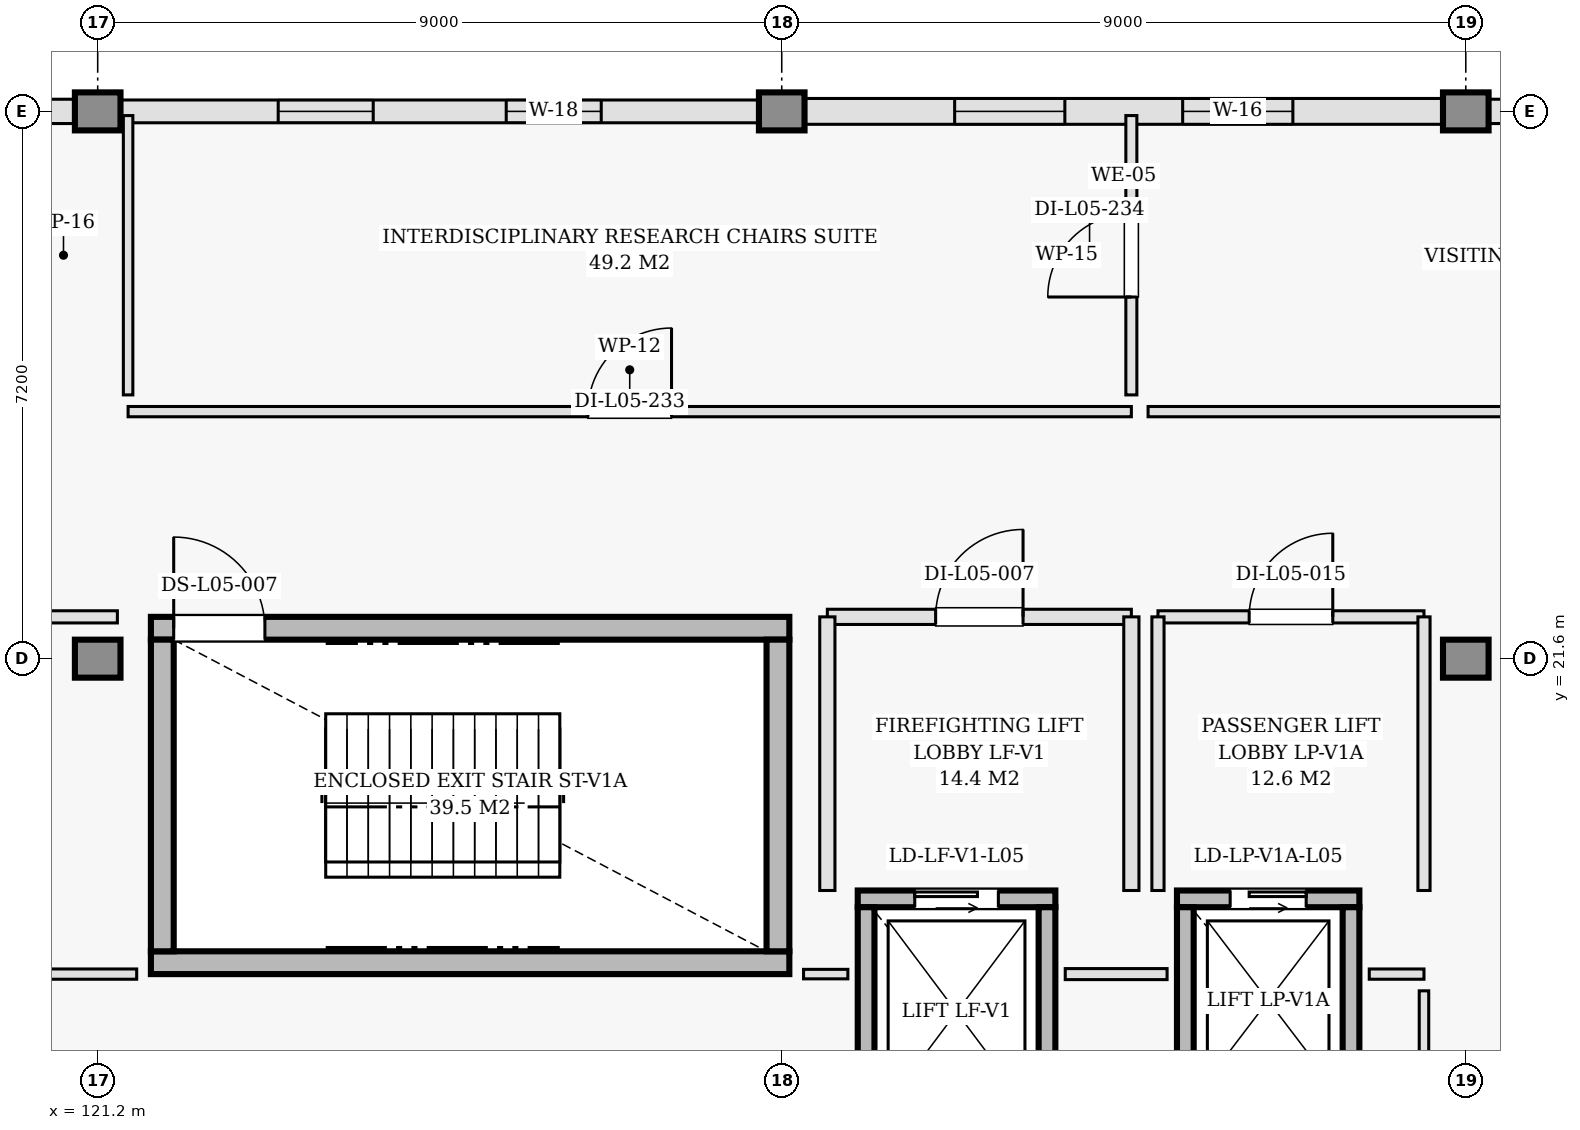
"""IFC4 building model, lengths in metres.
Left out: names, types, materials, properties, quantities, classifications, styles, units other than length and angle.
Written with IfcOpenShell. Run it as: python <this file> out.ifc"""

import sys

from ifc_helpers import new_model, si_unit, direction, frame, frame_2d, origin, origin_2d, place, context, subcontext, project, spatial, rectangle, extrude, element, fill, save


model = new_model("IFC4")
c1 = context("Model", 3, precision=1e-05, world=origin(), true_north=direction((0.0, 1.0)))
c2 = subcontext(c1, "Body", "Model", "MODEL_VIEW")
j1 = project(units=[si_unit("LENGTHUNIT", "METRE"), si_unit("PLANEANGLEUNIT", "RADIAN")], contexts=[c1])
p1 = place(None, origin())
s1 = spatial("IfcSite", under=j1, at=p1, CompositionType="ELEMENT")
p2 = place(p1, origin())
s2 = spatial("IfcBuilding", under=s1, at=p2, CompositionType="ELEMENT")
p3 = place(p2, frame((0.0, 0.0, 22.2)))
s3 = spatial("IfcBuildingStorey", under=s2, at=p3, CompositionType="ELEMENT", Elevation=22.2)
for number, where, z_axis, x_axis in (
    (1, (121.2, 21.6, 0.0), (0.0, 0.0, 1.0), (1.0, 0.0, 0.0)),
    (2, (121.2, 28.8, 0.0), (0.0, 0.0, 1.0), (1.0, 0.0, 0.0)),
    (3, (130.2, 28.8, 0.0), (0.0, 0.0, 1.0), (1.0, 0.0, 0.0)),
    (4, (139.2, 21.6, 0.0), (0.0, 0.0, 1.0), (1.0, 0.0, 0.0)),
    (5, (139.2, 28.8, 0.0), (0.0, 0.0, 1.0), (1.0, 0.0, 0.0)),
):
    element("IfcColumn", number, at=place(p3, frame(where, z_axis=z_axis, x_axis=x_axis)), inside=s3, PredefinedType="COLUMN", context=c2, shape_type="SweptSolid", body=[
        extrude(rectangle(XDim=0.5, YDim=0.5, at=origin_2d()), origin(), (0.0, 0.0, 1.0), 4.2),
    ])
p4 = place(p3, frame((148.2, 28.8, 0.0), z_axis=(0.0, 0.0, 1.0), x_axis=(-1.0, 0.0, 0.0)))
e6 = element("IfcWall", 6, at=p4, inside=s3, PredefinedType="SOLIDWALL", context=c2, shape_type="SweptSolid", body=[
    extrude(rectangle(XDim=9.0, YDim=0.32, at=frame_2d((4.5, 0.0))), origin(), (0.0, 0.0, 1.0), 3.165),
])
p5 = place(p4, frame((2.575, 0.0, 0.9)))
e7 = element("IfcOpeningElement", 7, at=p5, cuts=e6, PredefinedType="OPENING", context=c2, shape_type="SweptSolid", body=[
    extrude(rectangle(XDim=0.85, YDim=1.3, at=frame_2d((0.425, 0.65))), frame((0.0, 0.17, 0.0), z_axis=(0.0, -1.0, 0.0), x_axis=(1.0, 0.0, 0.0)), (0.0, 0.0, 1.0), 0.34),
])
p6 = place(p4, frame((5.575, 0.0, 0.9)))
e8 = element("IfcOpeningElement", 8, at=p6, cuts=e6, PredefinedType="OPENING", context=c2, shape_type="SweptSolid", body=[
    extrude(rectangle(XDim=0.85, YDim=1.3, at=frame_2d((0.425, 0.65))), frame((0.0, 0.17, 0.0), z_axis=(0.0, -1.0, 0.0), x_axis=(1.0, 0.0, 0.0)), (0.0, 0.0, 1.0), 0.34),
])
p7 = place(p3, frame((139.2, 28.8, 0.0), z_axis=(0.0, 0.0, 1.0), x_axis=(-1.0, 0.0, 0.0)))
e9 = element("IfcWall", 9, at=p7, inside=s3, PredefinedType="SOLIDWALL", context=c2, shape_type="SweptSolid", body=[
    extrude(rectangle(XDim=9.0, YDim=0.34, at=frame_2d((4.5, 0.0))), origin(), (0.0, 0.0, 1.0), 3.165),
])
p8 = place(p7, frame((2.275, 0.0, 0.9)))
e10 = element("IfcOpeningElement", 10, at=p8, cuts=e9, PredefinedType="OPENING", context=c2, shape_type="SweptSolid", body=[
    extrude(rectangle(XDim=1.45, YDim=1.6, at=frame_2d((0.725, 0.8))), frame((0.0, 0.18, 0.0), z_axis=(0.0, -1.0, 0.0), x_axis=(1.0, 0.0, 0.0)), (0.0, 0.0, 1.0), 0.36),
])
p9 = place(p7, frame((5.275, 0.0, 0.9)))
e11 = element("IfcOpeningElement", 11, at=p9, cuts=e9, PredefinedType="OPENING", context=c2, shape_type="SweptSolid", body=[
    extrude(rectangle(XDim=1.45, YDim=1.6, at=frame_2d((0.725, 0.8))), frame((0.0, 0.18, 0.0), z_axis=(0.0, -1.0, 0.0), x_axis=(1.0, 0.0, 0.0)), (0.0, 0.0, 1.0), 0.36),
])
p10 = place(p3, frame((130.2, 28.8, 0.0), z_axis=(0.0, 0.0, 1.0), x_axis=(-1.0, 0.0, 0.0)))
e12 = element("IfcWall", 12, at=p10, inside=s3, PredefinedType="SOLIDWALL", context=c2, shape_type="SweptSolid", body=[
    extrude(rectangle(XDim=9.0, YDim=0.3, at=frame_2d((4.5, 0.0))), origin(), (0.0, 0.0, 1.0), 3.165),
])
p11 = place(p10, frame((2.375, 0.0, 0.9)))
e13 = element("IfcOpeningElement", 13, at=p11, cuts=e12, PredefinedType="OPENING", context=c2, shape_type="SweptSolid", body=[
    extrude(rectangle(XDim=1.25, YDim=1.5, at=frame_2d((0.625, 0.75))), frame((0.0, 0.16, 0.0), z_axis=(0.0, -1.0, 0.0), x_axis=(1.0, 0.0, 0.0)), (0.0, 0.0, 1.0), 0.32),
])
p12 = place(p10, frame((5.375, 0.0, 0.9)))
e14 = element("IfcOpeningElement", 14, at=p12, cuts=e12, PredefinedType="OPENING", context=c2, shape_type="SweptSolid", body=[
    extrude(rectangle(XDim=1.25, YDim=1.5, at=frame_2d((0.625, 0.75))), frame((0.0, 0.16, 0.0), z_axis=(0.0, -1.0, 0.0), x_axis=(1.0, 0.0, 0.0)), (0.0, 0.0, 1.0), 0.32),
])
p13 = place(p3, frame((121.2, 28.8, 0.0), z_axis=(0.0, 0.0, 1.0), x_axis=(-1.0, 0.0, 0.0)))
e15 = element("IfcWall", 15, at=p13, inside=s3, PredefinedType="SOLIDWALL", context=c2, shape_type="SweptSolid", body=[
    extrude(rectangle(XDim=8.75, YDim=0.32, at=frame_2d((4.375, 0.0))), origin(), (0.0, 0.0, 1.0), 3.165),
])
p14 = place(p13, frame((2.392, 0.0, 0.9)))
e16 = element("IfcOpeningElement", 16, at=p14, cuts=e15, PredefinedType="OPENING", context=c2, shape_type="SweptSolid", body=[
    extrude(rectangle(XDim=1.05, YDim=1.4, at=frame_2d((0.525, 0.7))), frame((0.0, 0.17, 0.0), z_axis=(0.0, -1.0, 0.0), x_axis=(1.0, 0.0, 0.0)), (0.0, 0.0, 1.0), 0.34),
])
p15 = place(p13, frame((5.308, 0.0, 0.9)))
e17 = element("IfcOpeningElement", 17, at=p15, cuts=e15, PredefinedType="OPENING", context=c2, shape_type="SweptSolid", body=[
    extrude(rectangle(XDim=1.05, YDim=1.4, at=frame_2d((0.525, 0.7))), frame((0.0, 0.17, 0.0), z_axis=(0.0, -1.0, 0.0), x_axis=(1.0, 0.0, 0.0)), (0.0, 0.0, 1.0), 0.34),
])
p16 = place(p3, frame((121.9, 17.6, 0.0), z_axis=(0.0, 0.0, 1.0), x_axis=(1.0, 0.0, 0.0)))
e18 = element("IfcWall", 18, at=p16, inside=s3, PredefinedType="SHEAR", context=c2, shape_type="SweptSolid", body=[
    extrude(rectangle(XDim=8.4, YDim=0.3, at=frame_2d((4.2, 0.0))), origin(), (0.0, 0.0, 1.0), 3.98),
])
p17 = place(p3, frame((121.9, 22.0, 0.0), z_axis=(0.0, 0.0, 1.0), x_axis=(1.0, 0.0, 0.0)))
e19 = element("IfcWall", 19, at=p17, inside=s3, PredefinedType="SHEAR", context=c2, shape_type="SweptSolid", body=[
    extrude(rectangle(XDim=8.4, YDim=0.3, at=frame_2d((4.2, 0.0))), origin(), (0.0, 0.0, 1.0), 3.98),
])
p18 = place(p17, frame((0.3, 0.0, 0.0)))
e20 = element("IfcOpeningElement", 20, at=p18, cuts=e19, PredefinedType="OPENING", context=c2, shape_type="SweptSolid", body=[
    extrude(rectangle(XDim=1.2, YDim=2.15, at=frame_2d((0.6, 1.075))), frame((0.0, 0.16, 0.0), z_axis=(0.0, -1.0, 0.0), x_axis=(1.0, 0.0, 0.0)), (0.0, 0.0, 1.0), 0.32),
])
for number, where, z_axis, x_axis in (
    (21, (122.05, 17.75, 0.0), (0.0, 0.0, 1.0), (0.0, 1.0, 0.0)),
    (22, (130.15, 17.75, 0.0), (0.0, 0.0, 1.0), (0.0, 1.0, 0.0)),
):
    element("IfcWall", number, at=place(p3, frame(where, z_axis=z_axis, x_axis=x_axis)), inside=s3, PredefinedType="SHEAR", context=c2, shape_type="SweptSolid", body=[
        extrude(rectangle(XDim=4.1, YDim=0.3, at=frame_2d((2.05, 0.0))), origin(), (0.0, 0.0, 1.0), 3.98),
    ])
p19 = place(p3, frame((131.2, 18.44, 0.0), z_axis=(0.0, 0.0, 1.0), x_axis=(1.0, 0.0, 0.0)))
e23 = element("IfcWall", 23, at=p19, inside=s3, PredefinedType="SHEAR", context=c2, shape_type="SweptSolid", body=[
    extrude(rectangle(XDim=2.6, YDim=0.22, at=frame_2d((1.3, 0.0))), origin(), (0.0, 0.0, 1.0), 3.98),
])
p20 = place(p19, frame((0.75, 0.0, 0.0)))
e24 = element("IfcOpeningElement", 24, at=p20, cuts=e23, PredefinedType="OPENING", context=c2, shape_type="SweptSolid", body=[
    extrude(rectangle(XDim=1.1, YDim=2.15, at=frame_2d((0.55, 1.075))), frame((0.0, 0.12, 0.0), z_axis=(0.0, -1.0, 0.0), x_axis=(1.0, 0.0, 0.0)), (0.0, 0.0, 1.0), 0.24),
])
for number, where, z_axis, x_axis in (
    (25, (131.31, 15.57, 0.0), (0.0, 0.0, 1.0), (0.0, 1.0, 0.0)),
    (26, (133.69, 15.57, 0.0), (0.0, 0.0, 1.0), (0.0, 1.0, 0.0)),
):
    element("IfcWall", number, at=place(p3, frame(where, z_axis=z_axis, x_axis=x_axis)), inside=s3, PredefinedType="SHEAR", context=c2, shape_type="SweptSolid", body=[
        extrude(rectangle(XDim=2.76, YDim=0.22, at=frame_2d((1.38, 0.0))), origin(), (0.0, 0.0, 1.0), 3.98),
    ])
p21 = place(p3, frame((130.8, 22.15, 0.0), z_axis=(0.0, 0.0, 1.0), x_axis=(1.0, 0.0, 0.0)))
e27 = element("IfcWall", 27, at=p21, inside=s3, PredefinedType="PARTITIONING", context=c2, shape_type="SweptSolid", body=[
    extrude(rectangle(XDim=4.0, YDim=0.2, at=frame_2d((2.0, 0.0))), origin(), (0.0, 0.0, 1.0), 3.98),
])
p22 = place(p21, frame((1.425, 0.0, 0.0)))
e28 = element("IfcOpeningElement", 28, at=p22, cuts=e27, PredefinedType="OPENING", context=c2, shape_type="SweptSolid", body=[
    extrude(rectangle(XDim=1.15, YDim=2.15, at=frame_2d((0.575, 1.075))), frame((0.0, 0.11, 0.0), z_axis=(0.0, -1.0, 0.0), x_axis=(1.0, 0.0, 0.0)), (0.0, 0.0, 1.0), 0.22),
])
for number, where, z_axis, x_axis in (
    (29, (130.8, 18.55, 0.0), (0.0, 0.0, 1.0), (0.0, 1.0, 0.0)),
    (30, (134.8, 18.55, 0.0), (0.0, 0.0, 1.0), (0.0, 1.0, 0.0)),
):
    element("IfcWall", number, at=place(p3, frame(where, z_axis=z_axis, x_axis=x_axis)), inside=s3, PredefinedType="PARTITIONING", context=c2, shape_type="SweptSolid", body=[
        extrude(rectangle(XDim=3.6, YDim=0.2, at=frame_2d((1.8, 0.0))), origin(), (0.0, 0.0, 1.0), 3.98),
    ])
p23 = place(p3, frame((135.4, 18.44, 0.0), z_axis=(0.0, 0.0, 1.0), x_axis=(1.0, 0.0, 0.0)))
e31 = element("IfcWall", 31, at=p23, inside=s3, PredefinedType="SHEAR", context=c2, shape_type="SweptSolid", body=[
    extrude(rectangle(XDim=2.4, YDim=0.22, at=frame_2d((1.2, 0.0))), origin(), (0.0, 0.0, 1.0), 3.98),
])
p24 = place(p23, frame((0.7, 0.0, 0.0)))
e32 = element("IfcOpeningElement", 32, at=p24, cuts=e31, PredefinedType="OPENING", context=c2, shape_type="SweptSolid", body=[
    extrude(rectangle(XDim=1.0, YDim=2.15, at=frame_2d((0.5, 1.075))), frame((0.0, 0.12, 0.0), z_axis=(0.0, -1.0, 0.0), x_axis=(1.0, 0.0, 0.0)), (0.0, 0.0, 1.0), 0.24),
])
for number, where, z_axis, x_axis in (
    (33, (135.51, 15.87, 0.0), (0.0, 0.0, 1.0), (0.0, 1.0, 0.0)),
    (34, (137.69, 15.87, 0.0), (0.0, 0.0, 1.0), (0.0, 1.0, 0.0)),
):
    element("IfcWall", number, at=place(p3, frame(where, z_axis=z_axis, x_axis=x_axis)), inside=s3, PredefinedType="SHEAR", context=c2, shape_type="SweptSolid", body=[
        extrude(rectangle(XDim=2.46, YDim=0.22, at=frame_2d((1.23, 0.0))), origin(), (0.0, 0.0, 1.0), 3.98),
    ])
p25 = place(p3, frame((135.15, 22.15, 0.0), z_axis=(0.0, 0.0, 1.0), x_axis=(1.0, 0.0, 0.0)))
e35 = element("IfcWall", 35, at=p25, inside=s3, PredefinedType="PARTITIONING", context=c2, shape_type="SweptSolid", body=[
    extrude(rectangle(XDim=3.5, YDim=0.16, at=frame_2d((1.75, 0.0))), origin(), (0.0, 0.0, 1.0), 3.98),
])
p26 = place(p25, frame((1.2, 0.0, 0.0)))
e36 = element("IfcOpeningElement", 36, at=p26, cuts=e35, PredefinedType="OPENING", context=c2, shape_type="SweptSolid", body=[
    extrude(rectangle(XDim=1.1, YDim=2.15, at=frame_2d((0.55, 1.075))), frame((0.0, 0.09, 0.0), z_axis=(0.0, -1.0, 0.0), x_axis=(1.0, 0.0, 0.0)), (0.0, 0.0, 1.0), 0.18),
])
for number, where, z_axis, x_axis in (
    (37, (135.15, 18.55, 0.0), (0.0, 0.0, 1.0), (0.0, 1.0, 0.0)),
    (38, (138.65, 18.55, 0.0), (0.0, 0.0, 1.0), (0.0, 1.0, 0.0)),
):
    element("IfcWall", number, at=place(p3, frame(where, z_axis=z_axis, x_axis=x_axis)), inside=s3, PredefinedType="PARTITIONING", context=c2, shape_type="SweptSolid", body=[
        extrude(rectangle(XDim=3.6, YDim=0.16, at=frame_2d((1.8, 0.0))), origin(), (0.0, 0.0, 1.0), 3.98),
    ])
p27 = place(p3, frame((121.6, 24.85, 0.0), z_axis=(0.0, 0.0, 1.0), x_axis=(1.0, 0.0, 0.0)))
e39 = element("IfcWall", 39, at=p27, inside=s3, PredefinedType="PARTITIONING", context=c2, shape_type="SweptSolid", body=[
    extrude(rectangle(XDim=13.2, YDim=0.135, at=frame_2d((6.6, 0.0))), origin(), (0.0, 0.0, 1.0), 3.98),
])
p28 = place(p27, frame((6.05, 0.0, 0.0)))
e40 = element("IfcOpeningElement", 40, at=p28, cuts=e39, PredefinedType="OPENING", context=c2, shape_type="SweptSolid", body=[
    extrude(rectangle(XDim=1.1, YDim=2.15, at=frame_2d((0.55, 1.075))), frame((0.0, 0.078, 0.0), z_axis=(0.0, -1.0, 0.0), x_axis=(1.0, 0.0, 0.0)), (0.0, 0.0, 1.0), 0.155),
])
p29 = place(p3, frame((121.6, 25.07, 0.0), z_axis=(0.0, 0.0, 1.0), x_axis=(0.0, 1.0, 0.0)))
e41 = element("IfcWall", 41, at=p29, inside=s3, PredefinedType="PARTITIONING", context=c2, shape_type="SweptSolid", body=[
    extrude(rectangle(XDim=3.675, YDim=0.125, at=frame_2d((1.837, 0.0))), origin(), (0.0, 0.0, 1.0), 3.165),
])
p30 = place(p3, frame((134.8, 25.07, 0.0), z_axis=(0.0, 0.0, 1.0), x_axis=(0.0, 1.0, 0.0)))
e42 = element("IfcWall", 42, at=p30, inside=s3, PredefinedType="PARTITIONING", context=c2, shape_type="SweptSolid", body=[
    extrude(rectangle(XDim=3.675, YDim=0.145, at=frame_2d((1.837, 0.0))), origin(), (0.0, 0.0, 1.0), 3.165),
])
p31 = place(p30, frame((1.288, 0.0, 0.0)))
e43 = element("IfcOpeningElement", 43, at=p31, cuts=e42, PredefinedType="OPENING", context=c2, shape_type="SweptSolid", body=[
    extrude(rectangle(XDim=1.1, YDim=2.15, at=frame_2d((0.55, 1.075))), frame((0.0, 0.083, 0.0), z_axis=(0.0, -1.0, 0.0), x_axis=(1.0, 0.0, 0.0)), (0.0, 0.0, 1.0), 0.165),
])
p32 = place(p3, frame((135.02, 24.85, 0.0), z_axis=(0.0, 0.0, 1.0), x_axis=(1.0, 0.0, 0.0)))
e44 = element("IfcWall", 44, at=p32, inside=s3, PredefinedType="PARTITIONING", context=c2, shape_type="SweptSolid", body=[
    extrude(rectangle(XDim=13.18, YDim=0.135, at=frame_2d((6.59, 0.0))), origin(), (0.0, 0.0, 1.0), 3.315),
])
p33 = place(p3, frame((119.82, 17.45, 0.0), z_axis=(0.0, 0.0, 1.0), x_axis=(1.0, 0.0, 0.0)))
e45 = element("IfcWall", 45, at=p33, inside=s3, PredefinedType="PARTITIONING", context=c2, shape_type="SweptSolid", body=[
    extrude(rectangle(XDim=1.893, YDim=0.135, at=frame_2d((0.946, 0.0))), origin(), (0.0, 0.0, 1.0), 3.315),
])
p34 = place(p3, frame((130.487, 17.45, 0.0), z_axis=(0.0, 0.0, 1.0), x_axis=(1.0, 0.0, 0.0)))
e46 = element("IfcWall", 46, at=p34, inside=s3, PredefinedType="PARTITIONING", context=c2, shape_type="SweptSolid", body=[
    extrude(rectangle(XDim=0.583, YDim=0.125, at=frame_2d((0.292, 0.0))), origin(), (0.0, 0.0, 1.0), 3.98),
])
p35 = place(p3, frame((133.93, 17.45, 0.0), z_axis=(0.0, 0.0, 1.0), x_axis=(1.0, 0.0, 0.0)))
e47 = element("IfcWall", 47, at=p35, inside=s3, PredefinedType="PARTITIONING", context=c2, shape_type="SweptSolid", body=[
    extrude(rectangle(XDim=1.34, YDim=0.145, at=frame_2d((0.67, 0.0))), origin(), (0.0, 0.0, 1.0), 3.98),
])
p36 = place(p3, frame((137.93, 17.45, 0.0), z_axis=(0.0, 0.0, 1.0), x_axis=(1.0, 0.0, 0.0)))
e48 = element("IfcWall", 48, at=p36, inside=s3, PredefinedType="PARTITIONING", context=c2, shape_type="SweptSolid", body=[
    extrude(rectangle(XDim=0.72, YDim=0.135, at=frame_2d((0.36, 0.0))), origin(), (0.0, 0.0, 1.0), 3.98),
])
p37 = place(p3, frame((138.65, 14.6, 0.0), z_axis=(0.0, 0.0, 1.0), x_axis=(0.0, 1.0, 0.0)))
e49 = element("IfcWall", 49, at=p37, inside=s3, PredefinedType="PARTITIONING", context=c2, shape_type="SweptSolid", body=[
    extrude(rectangle(XDim=2.63, YDim=0.125, at=frame_2d((1.315, 0.0))), origin(), (0.0, 0.0, 1.0), 3.165),
])
p38 = place(p3, frame((119.6, 22.15, 0.0), z_axis=(0.0, 0.0, 1.0), x_axis=(1.0, 0.0, 0.0)))
e50 = element("IfcWall", 50, at=p38, inside=s3, PredefinedType="PARTITIONING", context=c2, shape_type="SweptSolid", body=[
    extrude(rectangle(XDim=1.859, YDim=0.16, at=frame_2d((0.929, 0.0))), origin(), (0.0, 0.0, 1.0), 3.315),
])
p39 = place(p8, origin())
e51 = element("IfcWindow", 51, at=p39, inside=s3, PartitioningType="DOUBLE_PANEL_VERTICAL", PredefinedType="WINDOW", context=c2, shape_type="SweptSolid", body=[
    extrude(rectangle(XDim=1.45, YDim=1.6, at=frame_2d((0.725, 0.8))), frame((0.0, 0.03, 0.0), z_axis=(0.0, -1.0, 0.0), x_axis=(1.0, 0.0, 0.0)), (0.0, 0.0, 1.0), 0.06),
])
fill(e10, e51)
p40 = place(p9, origin())
e52 = element("IfcWindow", 52, at=p40, inside=s3, PartitioningType="DOUBLE_PANEL_VERTICAL", PredefinedType="WINDOW", context=c2, shape_type="SweptSolid", body=[
    extrude(rectangle(XDim=1.45, YDim=1.6, at=frame_2d((0.725, 0.8))), frame((0.0, 0.03, 0.0), z_axis=(0.0, -1.0, 0.0), x_axis=(1.0, 0.0, 0.0)), (0.0, 0.0, 1.0), 0.06),
])
fill(e11, e52)
p41 = place(p11, origin())
e53 = element("IfcWindow", 53, at=p41, inside=s3, PartitioningType="DOUBLE_PANEL_VERTICAL", PredefinedType="WINDOW", context=c2, shape_type="SweptSolid", body=[
    extrude(rectangle(XDim=1.25, YDim=1.5, at=frame_2d((0.625, 0.75))), frame((0.0, 0.03, 0.0), z_axis=(0.0, -1.0, 0.0), x_axis=(1.0, 0.0, 0.0)), (0.0, 0.0, 1.0), 0.06),
])
fill(e13, e53)
p42 = place(p12, origin())
e54 = element("IfcWindow", 54, at=p42, inside=s3, PartitioningType="DOUBLE_PANEL_VERTICAL", PredefinedType="WINDOW", context=c2, shape_type="SweptSolid", body=[
    extrude(rectangle(XDim=1.25, YDim=1.5, at=frame_2d((0.625, 0.75))), frame((0.0, 0.03, 0.0), z_axis=(0.0, -1.0, 0.0), x_axis=(1.0, 0.0, 0.0)), (0.0, 0.0, 1.0), 0.06),
])
fill(e14, e54)
p43 = place(p18, origin())
e55 = element("IfcDoor", 55, at=p43, inside=s3, OperationType="SINGLE_SWING_LEFT", PredefinedType="DOOR", context=c2, shape_type="SweptSolid", body=[
    extrude(rectangle(XDim=1.2, YDim=2.15, at=frame_2d((0.6, 1.075))), frame((0.0, 0.025, 0.0), z_axis=(0.0, -1.0, 0.0), x_axis=(1.0, 0.0, 0.0)), (0.0, 0.0, 1.0), 0.05),
])
fill(e20, e55)
p44 = place(p20, origin())
e56 = element("IfcDoor", 56, at=p44, inside=s3, OperationType="SLIDING_TO_LEFT", PredefinedType="DOOR", context=c2, shape_type="SweptSolid", body=[
    extrude(rectangle(XDim=1.1, YDim=2.15, at=frame_2d((0.55, 1.075))), frame((0.0, 0.025, 0.0), z_axis=(0.0, -1.0, 0.0), x_axis=(1.0, 0.0, 0.0)), (0.0, 0.0, 1.0), 0.05),
])
fill(e24, e56)
p45 = place(p22, origin())
e57 = element("IfcDoor", 57, at=p45, inside=s3, OperationType="SINGLE_SWING_RIGHT", PredefinedType="DOOR", context=c2, shape_type="SweptSolid", body=[
    extrude(rectangle(XDim=1.15, YDim=2.15, at=frame_2d((0.575, 1.075))), frame((0.0, 0.025, 0.0), z_axis=(0.0, -1.0, 0.0), x_axis=(1.0, 0.0, 0.0)), (0.0, 0.0, 1.0), 0.05),
])
fill(e28, e57)
p46 = place(p24, origin())
e58 = element("IfcDoor", 58, at=p46, inside=s3, OperationType="SLIDING_TO_RIGHT", PredefinedType="DOOR", context=c2, shape_type="SweptSolid", body=[
    extrude(rectangle(XDim=1.0, YDim=2.15, at=frame_2d((0.5, 1.075))), frame((0.0, 0.025, 0.0), z_axis=(0.0, -1.0, 0.0), x_axis=(1.0, 0.0, 0.0)), (0.0, 0.0, 1.0), 0.05),
])
fill(e32, e58)
p47 = place(p26, origin())
e59 = element("IfcDoor", 59, at=p47, inside=s3, OperationType="SINGLE_SWING_RIGHT", PredefinedType="DOOR", context=c2, shape_type="SweptSolid", body=[
    extrude(rectangle(XDim=1.1, YDim=2.15, at=frame_2d((0.55, 1.075))), frame((0.0, 0.025, 0.0), z_axis=(0.0, -1.0, 0.0), x_axis=(1.0, 0.0, 0.0)), (0.0, 0.0, 1.0), 0.05),
])
fill(e36, e59)
p48 = place(p28, origin())
e60 = element("IfcDoor", 60, at=p48, inside=s3, OperationType="SINGLE_SWING_RIGHT", PredefinedType="DOOR", context=c2, shape_type="SweptSolid", body=[
    extrude(rectangle(XDim=1.1, YDim=2.15, at=frame_2d((0.55, 1.075))), frame((0.0, 0.025, 0.0), z_axis=(0.0, -1.0, 0.0), x_axis=(1.0, 0.0, 0.0)), (0.0, 0.0, 1.0), 0.05),
])
fill(e40, e60)
p49 = place(p31, origin())
e61 = element("IfcDoor", 61, at=p49, inside=s3, OperationType="SINGLE_SWING_LEFT", PredefinedType="DOOR", context=c2, shape_type="SweptSolid", body=[
    extrude(rectangle(XDim=1.1, YDim=2.15, at=frame_2d((0.55, 1.075))), frame((0.0, 0.025, 0.0), z_axis=(0.0, -1.0, 0.0), x_axis=(1.0, 0.0, 0.0)), (0.0, 0.0, 1.0), 0.05),
])
fill(e43, e61)
save(model, sys.argv[1])
